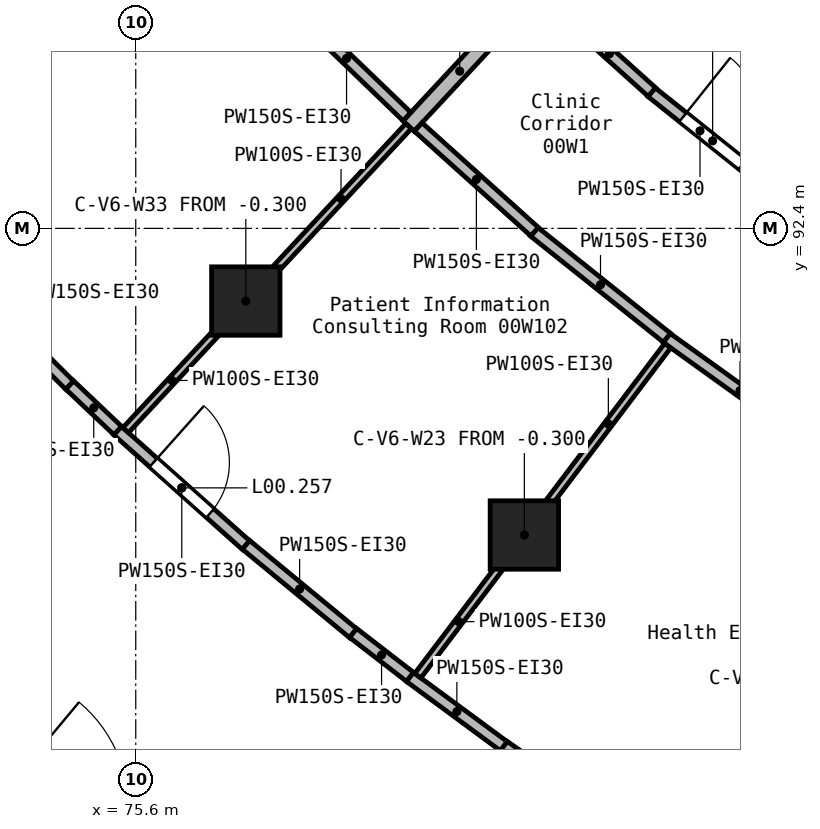
"""IFC4 building model, lengths in metres.
Left out: names, types, materials, properties, quantities, classifications, styles, units other than length and angle.
Written with IfcOpenShell. Run it as: python <this file> out.ifc"""

import sys

from ifc_helpers import new_model, si_unit, direction, frame, frame_2d, origin, origin_2d, place, context, subcontext, project, spatial, rectangle, extrude, element, fill, save


model = new_model("IFC4")
c1 = context("Model", 3, precision=1e-05, world=origin(), true_north=direction((0.0, 1.0)))
c2 = subcontext(c1, "Body", "Model", "MODEL_VIEW")
j1 = project(units=[si_unit("LENGTHUNIT", "METRE"), si_unit("PLANEANGLEUNIT", "RADIAN")], contexts=[c1])
p1 = place(None, origin())
s1 = spatial("IfcSite", under=j1, at=p1, CompositionType="ELEMENT")
p2 = place(p1, origin())
s2 = spatial("IfcBuilding", under=s1, at=p2, CompositionType="ELEMENT")
p3 = place(p2, origin())
s3 = spatial("IfcBuildingStorey", under=s2, at=p3, CompositionType="ELEMENT", Elevation=0.0)
for number, where, z_axis, x_axis in (
    (1, (77.048, 91.444, -0.3), (0.0, 0.0, 1.0), (1.0, 0.0, 0.0)),
    (2, (80.713, 88.366, -0.3), (0.0, 0.0, 1.0), (1.0, 0.0, 0.0)),
):
    element("IfcColumn", number, at=place(p3, frame(where, z_axis=z_axis, x_axis=x_axis)), inside=s3, PredefinedType="COLUMN", context=c2, shape_type="SweptSolid", body=[
        extrude(rectangle(XDim=0.9, YDim=0.9, at=origin_2d()), origin(), (0.0, 0.0, 1.0), 5.7),
    ])
p4 = place(p3, frame((79.19, 93.746, 0.0), z_axis=(0.0, 0.0, 1.0), x_axis=(0.681171780306, 0.732123627344, 0.0)))
e3 = element("IfcWall", 3, at=p4, inside=s3, PredefinedType="SOLIDWALL", context=c2, shape_type="SweptSolid", body=[
    extrude(rectangle(XDim=1.974, YDim=0.2, at=frame_2d((0.987, 0.0))), origin(), (0.0, 0.0, 1.0), 5.05),
])
p5 = place(p3, frame((82.583, 90.961, 0.0), z_axis=(0.0, 0.0, 1.0), x_axis=(0.812456963848, -0.583021167622, 0.0)))
e4 = element("IfcWall", 4, at=p5, inside=s3, PredefinedType="PARTITIONING", context=c2, shape_type="SweptSolid", body=[
    extrude(rectangle(XDim=2.381, YDim=0.15, at=frame_2d((1.191, 0.0))), origin(), (0.0, 0.0, 1.0), 5.05),
])
p6 = place(p3, frame((80.841, 92.356, 0.0), z_axis=(0.0, 0.0, 1.0), x_axis=(0.781561025488, -0.62382879337, 0.0)))
e5 = element("IfcWall", 5, at=p6, inside=s3, PredefinedType="PARTITIONING", context=c2, shape_type="SweptSolid", body=[
    extrude(rectangle(XDim=2.235, YDim=0.15, at=frame_2d((1.118, 0.0))), origin(), (0.0, 0.0, 1.0), 5.05),
])
p7 = place(p3, frame((77.579, 95.4, 0.0), z_axis=(0.0, 0.0, 1.0), x_axis=(0.720594722174, -0.693356507415, 0.0)))
e6 = element("IfcWall", 6, at=p7, inside=s3, PredefinedType="PARTITIONING", context=c2, shape_type="SweptSolid", body=[
    extrude(rectangle(XDim=2.205, YDim=0.15, at=frame_2d((1.103, 0.0))), origin(), (0.0, 0.0, 1.0), 5.05),
])
p8 = place(p3, frame((79.316, 93.733, 0.0), z_axis=(0.0, 0.0, 1.0), x_axis=(0.74346507851, -0.668774758073, 0.0)))
e7 = element("IfcWall", 7, at=p8, inside=s3, PredefinedType="PARTITIONING", context=c2, shape_type="SweptSolid", body=[
    extrude(rectangle(XDim=2.059, YDim=0.15, at=frame_2d((1.03, 0.0))), origin(), (0.0, 0.0, 1.0), 5.05),
])
p9 = place(p3, frame((75.36, 89.74, 0.0), z_axis=(0.0, 0.0, 1.0), x_axis=(0.746361982095, -0.665540225443, 0.0)))
e8 = element("IfcWall", 8, at=p9, inside=s3, PredefinedType="PARTITIONING", context=c2, shape_type="SweptSolid", body=[
    extrude(rectangle(XDim=2.266, YDim=0.15, at=frame_2d((1.133, 0.0))), origin(), (0.0, 0.0, 1.0), 5.05),
])
p10 = place(p9, frame((0.633, 0.0, 0.0)))
e9 = element("IfcOpeningElement", 9, at=p10, cuts=e8, PredefinedType="OPENING", context=c2, shape_type="SweptSolid", body=[
    extrude(rectangle(XDim=1.0, YDim=2.1, at=frame_2d((0.5, 1.05))), frame((0.0, 0.085, 0.0), z_axis=(0.0, -1.0, 0.0), x_axis=(1.0, 0.0, 0.0)), (0.0, 0.0, 1.0), 0.17),
])
p11 = place(p3, frame((82.385, 94.194, 0.0), z_axis=(0.0, 0.0, 1.0), x_axis=(0.781756052881, -0.623584375833, 0.0)))
e10 = element("IfcWall", 10, at=p11, inside=s3, PredefinedType="PARTITIONING", context=c2, shape_type="SweptSolid", body=[
    extrude(rectangle(XDim=1.636, YDim=0.15, at=frame_2d((0.818, 0.0))), origin(), (0.0, 0.0, 1.0), 5.05),
])
p12 = place(p11, frame((0.53, 0.0, 0.0)))
e11 = element("IfcOpeningElement", 11, at=p12, cuts=e10, PredefinedType="OPENING", context=c2, shape_type="SweptSolid", body=[
    extrude(rectangle(XDim=1.0, YDim=2.1, at=frame_2d((0.5, 1.05))), frame((0.0, 0.085, 0.0), z_axis=(0.0, -1.0, 0.0), x_axis=(1.0, 0.0, 0.0)), (0.0, 0.0, 1.0), 0.17),
])
p13 = place(p3, frame((81.273, 95.199, 0.0), z_axis=(0.0, 0.0, 1.0), x_axis=(0.743576936712, -0.668650386368, 0.0)))
e12 = element("IfcWall", 12, at=p13, inside=s3, PredefinedType="PARTITIONING", context=c2, shape_type="SweptSolid", body=[
    extrude(rectangle(XDim=1.502, YDim=0.15, at=frame_2d((0.751, 0.0))), origin(), (0.0, 0.0, 1.0), 5.05),
])
p14 = place(p3, frame((77.051, 88.236, 0.0), z_axis=(0.0, 0.0, 1.0), x_axis=(0.771517511576, -0.636208086502, 0.0)))
e13 = element("IfcWall", 13, at=p14, inside=s3, PredefinedType="PARTITIONING", context=c2, shape_type="SweptSolid", body=[
    extrude(rectangle(XDim=1.828, YDim=0.15, at=frame_2d((0.914, 0.0))), origin(), (0.0, 0.0, 1.0), 5.05),
])
p15 = place(p3, frame((79.206, 86.5, 0.0), z_axis=(0.0, 0.0, 1.0), x_axis=(0.804960127747, -0.593328907721, 0.0)))
e14 = element("IfcWall", 14, at=p15, inside=s3, PredefinedType="PARTITIONING", context=c2, shape_type="SweptSolid", body=[
    extrude(rectangle(XDim=1.539, YDim=0.15, at=frame_2d((0.77, 0.0))), origin(), (0.0, 0.0, 1.0), 5.05),
])
p16 = place(p3, frame((73.851, 91.211, 0.0), z_axis=(0.0, 0.0, 1.0), x_axis=(0.709168733207, -0.70503879882, 0.0)))
e15 = element("IfcWall", 15, at=p16, inside=s3, PredefinedType="PARTITIONING", context=c2, shape_type="SweptSolid", body=[
    extrude(rectangle(XDim=1.241, YDim=0.15, at=frame_2d((0.621, 0.0))), origin(), (0.0, 0.0, 1.0), 5.05),
])
p17 = place(p3, frame((80.444, 85.589, 0.0), z_axis=(0.0, 0.0, 1.0), x_axis=(0.821096473197, -0.570789437274, 0.0)))
e16 = element("IfcWall", 16, at=p17, inside=s3, PredefinedType="PARTITIONING", context=c2, shape_type="SweptSolid", body=[
    extrude(rectangle(XDim=1.093, YDim=0.15, at=frame_2d((0.546, 0.0))), origin(), (0.0, 0.0, 1.0), 5.05),
])
p18 = place(p3, frame((78.46, 87.077, 0.0), z_axis=(0.0, 0.0, 1.0), x_axis=(0.791671493317, -0.610947008069, 0.0)))
e17 = element("IfcWall", 17, at=p18, inside=s3, PredefinedType="PARTITIONING", context=c2, shape_type="SweptSolid", body=[
    extrude(rectangle(XDim=0.944, YDim=0.15, at=frame_2d((0.472, 0.0))), origin(), (0.0, 0.0, 1.0), 5.05),
])
p19 = place(p3, frame((74.731, 90.339, 0.0), z_axis=(0.0, 0.0, 1.0), x_axis=(0.725923200466, -0.687775767984, 0.0)))
e18 = element("IfcWall", 18, at=p19, inside=s3, PredefinedType="PARTITIONING", context=c2, shape_type="SweptSolid", body=[
    extrude(rectangle(XDim=0.87, YDim=0.15, at=frame_2d((0.435, 0.0))), origin(), (0.0, 0.0, 1.0), 5.05),
])
p20 = place(p3, frame((75.468, 89.746, 0.0), z_axis=(0.0, 0.0, 1.0), x_axis=(0.681143154038, 0.732150260334, 0.0)))
e19 = element("IfcWall", 19, at=p20, inside=s3, PredefinedType="PARTITIONING", context=c2, shape_type="SweptSolid", body=[
    extrude(rectangle(XDim=1.785, YDim=0.1, at=frame_2d((0.893, 0.0))), origin(), (0.0, 0.0, 1.0), 5.05),
])
p21 = place(p3, frame((77.412, 91.835, 0.0), z_axis=(0.0, 0.0, 1.0), x_axis=(0.681147107729, 0.732146582067, 0.0)))
e20 = element("IfcWall", 20, at=p21, inside=s3, PredefinedType="PARTITIONING", context=c2, shape_type="SweptSolid", body=[
    extrude(rectangle(XDim=2.609, YDim=0.1, at=frame_2d((1.304, 0.0))), origin(), (0.0, 0.0, 1.0), 5.05),
])
p22 = place(p3, frame((79.312, 86.515, 0.0), z_axis=(0.0, 0.0, 1.0), x_axis=(0.603588624137, 0.797295912954, 0.0)))
e21 = element("IfcWall", 21, at=p22, inside=s3, PredefinedType="PARTITIONING", context=c2, shape_type="SweptSolid", body=[
    extrude(rectangle(XDim=1.782, YDim=0.1, at=frame_2d((0.891, 0.0))), origin(), (0.0, 0.0, 1.0), 5.05),
])
p23 = place(p3, frame((81.038, 88.796, 0.0), z_axis=(0.0, 0.0, 1.0), x_axis=(0.603561177332, 0.797316690668, 0.0)))
e22 = element("IfcWall", 22, at=p23, inside=s3, PredefinedType="PARTITIONING", context=c2, shape_type="SweptSolid", body=[
    extrude(rectangle(XDim=2.584, YDim=0.1, at=frame_2d((1.292, 0.0))), origin(), (0.0, 0.0, 1.0), 5.05),
])
p24 = place(p10, origin())
e23 = element("IfcDoor", 23, at=p24, inside=s3, OperationType="SINGLE_SWING_LEFT", PredefinedType="DOOR", context=c2, shape_type="SweptSolid", body=[
    extrude(rectangle(XDim=1.0, YDim=2.1, at=frame_2d((0.5, 1.05))), frame((0.0, 0.025, 0.0), z_axis=(0.0, -1.0, 0.0), x_axis=(1.0, 0.0, 0.0)), (0.0, 0.0, 1.0), 0.05),
])
fill(e9, e23)
p25 = place(p12, origin())
e24 = element("IfcDoor", 24, at=p25, inside=s3, OperationType="SINGLE_SWING_RIGHT", PredefinedType="DOOR", context=c2, shape_type="SweptSolid", body=[
    extrude(rectangle(XDim=1.0, YDim=2.1, at=frame_2d((0.5, 1.05))), frame((0.0, 0.025, 0.0), z_axis=(0.0, -1.0, 0.0), x_axis=(1.0, 0.0, 0.0)), (0.0, 0.0, 1.0), 0.05),
])
fill(e11, e24)
save(model, sys.argv[1])
